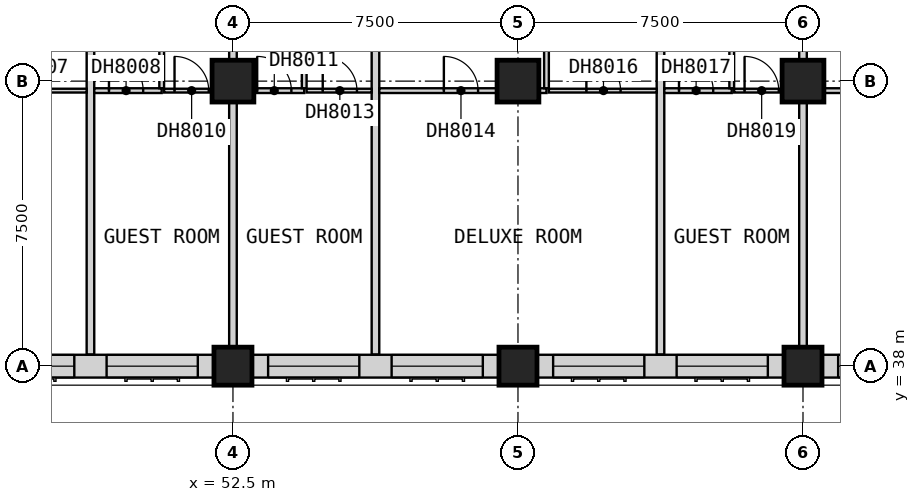
"""IFC4 building model, lengths in metres.
Left out: names, types, materials, properties, quantities, classifications, styles, units other than length and angle.
Written with IfcOpenShell. Run it as: python <this file> out.ifc"""

import sys

from ifc_helpers import new_model, si_unit, direction, frame, frame_2d, origin, origin_2d, place, context, subcontext, project, spatial, rectangle, extrude, element, fill, save


model = new_model("IFC4")
c1 = context("Model", 3, precision=1e-05, world=origin(), true_north=direction((0.0, 1.0)))
c2 = subcontext(c1, "Body", "Model", "MODEL_VIEW")
j1 = project(units=[si_unit("LENGTHUNIT", "METRE"), si_unit("PLANEANGLEUNIT", "RADIAN")], contexts=[c1])
p1 = place(None, origin())
s1 = spatial("IfcSite", under=j1, at=p1, CompositionType="ELEMENT")
p2 = place(p1, origin())
s2 = spatial("IfcBuilding", under=s1, at=p2, CompositionType="ELEMENT")
p3 = place(p2, frame((0.0, 0.0, 89.9)))
s3 = spatial("IfcBuildingStorey", under=s2, at=p3, CompositionType="ELEMENT", Elevation=89.9)
p4 = place(p3, frame((52.5, 38.0, 0.0), z_axis=(0.0, 0.0, 1.0), x_axis=(1.0, 0.0, 0.0)))
e1 = element("IfcColumn", 1, at=p4, inside=s3, PredefinedType="COLUMN", context=c2, shape_type="SweptSolid", body=[
    extrude(rectangle(XDim=1.0, YDim=1.0, at=origin_2d()), origin(), (0.0, 0.0, 1.0), 3.6),
])
p5 = place(p3, frame((52.5, 45.5, 0.0), z_axis=(0.0, 0.0, 1.0), x_axis=(1.0, 0.0, 0.0)))
e2 = element("IfcColumn", 2, at=p5, inside=s3, PredefinedType="COLUMN", context=c2, shape_type="SweptSolid", body=[
    extrude(rectangle(XDim=1.1, YDim=1.1, at=origin_2d()), origin(), (0.0, 0.0, 1.0), 3.6),
])
p6 = place(p3, frame((60.0, 38.0, 0.0), z_axis=(0.0, 0.0, 1.0), x_axis=(1.0, 0.0, 0.0)))
e3 = element("IfcColumn", 3, at=p6, inside=s3, PredefinedType="COLUMN", context=c2, shape_type="SweptSolid", body=[
    extrude(rectangle(XDim=1.0, YDim=1.0, at=origin_2d()), origin(), (0.0, 0.0, 1.0), 3.6),
])
p7 = place(p3, frame((60.0, 45.5, 0.0), z_axis=(0.0, 0.0, 1.0), x_axis=(1.0, 0.0, 0.0)))
e4 = element("IfcColumn", 4, at=p7, inside=s3, PredefinedType="COLUMN", context=c2, shape_type="SweptSolid", body=[
    extrude(rectangle(XDim=1.1, YDim=1.1, at=origin_2d()), origin(), (0.0, 0.0, 1.0), 3.6),
])
p8 = place(p3, frame((67.5, 38.0, 0.0), z_axis=(0.0, 0.0, 1.0), x_axis=(1.0, 0.0, 0.0)))
e5 = element("IfcColumn", 5, at=p8, inside=s3, PredefinedType="COLUMN", context=c2, shape_type="SweptSolid", body=[
    extrude(rectangle(XDim=1.0, YDim=1.0, at=origin_2d()), origin(), (0.0, 0.0, 1.0), 3.6),
])
p9 = place(p3, frame((67.5, 45.5, 0.0), z_axis=(0.0, 0.0, 1.0), x_axis=(1.0, 0.0, 0.0)))
e6 = element("IfcColumn", 6, at=p9, inside=s3, PredefinedType="COLUMN", context=c2, shape_type="SweptSolid", body=[
    extrude(rectangle(XDim=1.1, YDim=1.1, at=origin_2d()), origin(), (0.0, 0.0, 1.0), 3.6),
])
p10 = place(p3, frame((45.5, 38.0, 0.0), z_axis=(0.0, 0.0, 1.0), x_axis=(1.0, 0.0, 0.0)))
e7 = element("IfcWall", 7, at=p10, inside=s3, PredefinedType="SOLIDWALL", context=c2, shape_type="SweptSolid", body=[
    extrude(rectangle(XDim=6.5, YDim=0.6, at=frame_2d((3.25, 0.0))), origin(), (0.0, 0.0, 1.0), 2.85),
])
p11 = place(p10, frame((0.425, 0.0, 0.8)))
e8 = element("IfcOpeningElement", 8, at=p11, cuts=e7, PredefinedType="OPENING", context=c2, shape_type="SweptSolid", body=[
    extrude(rectangle(XDim=2.4, YDim=1.8, at=frame_2d((1.2, 0.9))), frame((0.0, 0.31, 0.0), z_axis=(0.0, -1.0, 0.0), x_axis=(1.0, 0.0, 0.0)), (0.0, 0.0, 1.0), 0.62),
])
p12 = place(p10, frame((3.675, 0.0, 0.8)))
e9 = element("IfcOpeningElement", 9, at=p12, cuts=e7, PredefinedType="OPENING", context=c2, shape_type="SweptSolid", body=[
    extrude(rectangle(XDim=2.4, YDim=1.8, at=frame_2d((1.2, 0.9))), frame((0.0, 0.31, 0.0), z_axis=(0.0, -1.0, 0.0), x_axis=(1.0, 0.0, 0.0)), (0.0, 0.0, 1.0), 0.62),
])
p13 = place(p3, frame((53.0, 38.0, 0.0), z_axis=(0.0, 0.0, 1.0), x_axis=(1.0, 0.0, 0.0)))
e10 = element("IfcWall", 10, at=p13, inside=s3, PredefinedType="SOLIDWALL", context=c2, shape_type="SweptSolid", body=[
    extrude(rectangle(XDim=6.5, YDim=0.6, at=frame_2d((3.25, 0.0))), origin(), (0.0, 0.0, 1.0), 2.85),
])
p14 = place(p13, frame((0.425, 0.0, 0.8)))
e11 = element("IfcOpeningElement", 11, at=p14, cuts=e10, PredefinedType="OPENING", context=c2, shape_type="SweptSolid", body=[
    extrude(rectangle(XDim=2.4, YDim=1.8, at=frame_2d((1.2, 0.9))), frame((0.0, 0.31, 0.0), z_axis=(0.0, -1.0, 0.0), x_axis=(1.0, 0.0, 0.0)), (0.0, 0.0, 1.0), 0.62),
])
p15 = place(p13, frame((3.675, 0.0, 0.8)))
e12 = element("IfcOpeningElement", 12, at=p15, cuts=e10, PredefinedType="OPENING", context=c2, shape_type="SweptSolid", body=[
    extrude(rectangle(XDim=2.4, YDim=1.8, at=frame_2d((1.2, 0.9))), frame((0.0, 0.31, 0.0), z_axis=(0.0, -1.0, 0.0), x_axis=(1.0, 0.0, 0.0)), (0.0, 0.0, 1.0), 0.62),
])
p16 = place(p3, frame((60.5, 38.0, 0.0), z_axis=(0.0, 0.0, 1.0), x_axis=(1.0, 0.0, 0.0)))
e13 = element("IfcWall", 13, at=p16, inside=s3, PredefinedType="SOLIDWALL", context=c2, shape_type="SweptSolid", body=[
    extrude(rectangle(XDim=6.5, YDim=0.6, at=frame_2d((3.25, 0.0))), origin(), (0.0, 0.0, 1.0), 2.85),
])
p17 = place(p16, frame((0.425, 0.0, 0.8)))
e14 = element("IfcOpeningElement", 14, at=p17, cuts=e13, PredefinedType="OPENING", context=c2, shape_type="SweptSolid", body=[
    extrude(rectangle(XDim=2.4, YDim=1.8, at=frame_2d((1.2, 0.9))), frame((0.0, 0.31, 0.0), z_axis=(0.0, -1.0, 0.0), x_axis=(1.0, 0.0, 0.0)), (0.0, 0.0, 1.0), 0.62),
])
p18 = place(p16, frame((3.675, 0.0, 0.8)))
e15 = element("IfcOpeningElement", 15, at=p18, cuts=e13, PredefinedType="OPENING", context=c2, shape_type="SweptSolid", body=[
    extrude(rectangle(XDim=2.4, YDim=1.8, at=frame_2d((1.2, 0.9))), frame((0.0, 0.31, 0.0), z_axis=(0.0, -1.0, 0.0), x_axis=(1.0, 0.0, 0.0)), (0.0, 0.0, 1.0), 0.62),
])
p19 = place(p3, frame((68.0, 38.0, 0.0), z_axis=(0.0, 0.0, 1.0), x_axis=(1.0, 0.0, 0.0)))
e16 = element("IfcWall", 16, at=p19, inside=s3, PredefinedType="SOLIDWALL", context=c2, shape_type="SweptSolid", body=[
    extrude(rectangle(XDim=6.0, YDim=0.6, at=frame_2d((3.0, 0.0))), origin(), (0.0, 0.0, 1.0), 2.85),
])
p20 = place(p19, frame((0.425, 0.0, 0.8)))
e17 = element("IfcOpeningElement", 17, at=p20, cuts=e16, PredefinedType="OPENING", context=c2, shape_type="SweptSolid", body=[
    extrude(rectangle(XDim=2.4, YDim=1.8, at=frame_2d((1.2, 0.9))), frame((0.0, 0.31, 0.0), z_axis=(0.0, -1.0, 0.0), x_axis=(1.0, 0.0, 0.0)), (0.0, 0.0, 1.0), 0.62),
])
p21 = place(p19, frame((3.425, 0.0, 0.8)))
e18 = element("IfcOpeningElement", 18, at=p21, cuts=e16, PredefinedType="OPENING", context=c2, shape_type="SweptSolid", body=[
    extrude(rectangle(XDim=2.4, YDim=1.8, at=frame_2d((1.2, 0.9))), frame((0.0, 0.31, 0.0), z_axis=(0.0, -1.0, 0.0), x_axis=(1.0, 0.0, 0.0)), (0.0, 0.0, 1.0), 0.62),
])
p22 = place(p3, frame((48.75, 38.31, 0.0), z_axis=(0.0, 0.0, 1.0), x_axis=(0.0, 1.0, 0.0)))
e19 = element("IfcWall", 19, at=p22, inside=s3, PredefinedType="PARTITIONING", context=c2, shape_type="SweptSolid", body=[
    extrude(rectangle(XDim=11.715, YDim=0.2, at=frame_2d((5.857, 0.0))), origin(), (0.0, 0.0, 1.0), 3.35),
])
p23 = place(p3, frame((52.5, 37.5, 0.0), z_axis=(0.0, 0.0, 1.0), x_axis=(0.0, 1.0, 0.0)))
e20 = element("IfcWall", 20, at=p23, inside=s3, PredefinedType="PARTITIONING", context=c2, shape_type="SweptSolid", body=[
    extrude(rectangle(XDim=12.525, YDim=0.2, at=frame_2d((6.262, 0.0))), origin(), (0.0, 0.0, 1.0), 3.35),
])
for number, where, z_axis, x_axis in (
    (21, (56.25, 38.31, 0.0), (0.0, 0.0, 1.0), (0.0, 1.0, 0.0)),
    (22, (63.75, 38.31, 0.0), (0.0, 0.0, 1.0), (0.0, 1.0, 0.0)),
):
    element("IfcWall", number, at=place(p3, frame(where, z_axis=z_axis, x_axis=x_axis)), inside=s3, PredefinedType="PARTITIONING", context=c2, shape_type="SweptSolid", body=[
        extrude(rectangle(XDim=11.715, YDim=0.2, at=frame_2d((5.857, 0.0))), origin(), (0.0, 0.0, 1.0), 3.35),
    ])
p24 = place(p3, frame((67.5, 37.5, 0.0), z_axis=(0.0, 0.0, 1.0), x_axis=(0.0, 1.0, 0.0)))
e23 = element("IfcWall", 23, at=p24, inside=s3, PredefinedType="PARTITIONING", context=c2, shape_type="SweptSolid", body=[
    extrude(rectangle(XDim=12.525, YDim=0.2, at=frame_2d((6.262, 0.0))), origin(), (0.0, 0.0, 1.0), 3.35),
])
p25 = place(p3, frame((45.812, 45.25, 0.0), z_axis=(0.0, 0.0, 1.0), x_axis=(1.0, 0.0, 0.0)))
e24 = element("IfcWall", 24, at=p25, inside=s3, PredefinedType="PARTITIONING", context=c2, shape_type="SweptSolid", body=[
    extrude(rectangle(XDim=2.837, YDim=0.1, at=frame_2d((1.419, 0.0))), origin(), (0.0, 0.0, 1.0), 3.35),
])
p26 = place(p25, frame((0.988, 0.0, 0.0)))
e25 = element("IfcOpeningElement", 25, at=p26, cuts=e24, PredefinedType="OPENING", context=c2, shape_type="SweptSolid", body=[
    extrude(rectangle(XDim=0.9, YDim=2.1, at=frame_2d((0.45, 1.05))), frame((0.0, 0.06, 0.0), z_axis=(0.0, -1.0, 0.0), x_axis=(1.0, 0.0, 0.0)), (0.0, 0.0, 1.0), 0.12),
])
p27 = place(p3, frame((50.688, 45.25, 0.0), z_axis=(0.0, 0.0, 1.0), x_axis=(1.0, 0.0, 0.0)))
e26 = element("IfcWall", 26, at=p27, inside=s3, PredefinedType="PARTITIONING", context=c2, shape_type="SweptSolid", body=[
    extrude(rectangle(XDim=1.712, YDim=0.1, at=frame_2d((0.856, 0.0))), origin(), (0.0, 0.0, 1.0), 3.35),
])
p28 = place(p27, frame((0.275, 0.0, 0.0)))
e27 = element("IfcOpeningElement", 27, at=p28, cuts=e26, PredefinedType="OPENING", context=c2, shape_type="SweptSolid", body=[
    extrude(rectangle(XDim=0.9, YDim=2.1, at=frame_2d((0.45, 1.05))), frame((0.0, 0.06, 0.0), z_axis=(0.0, -1.0, 0.0), x_axis=(1.0, 0.0, 0.0)), (0.0, 0.0, 1.0), 0.12),
])
p29 = place(p3, frame((54.438, 45.25, 0.0), z_axis=(0.0, 0.0, 1.0), x_axis=(1.0, 0.0, 0.0)))
e28 = element("IfcWall", 28, at=p29, inside=s3, PredefinedType="PARTITIONING", context=c2, shape_type="SweptSolid", body=[
    extrude(rectangle(XDim=1.712, YDim=0.1, at=frame_2d((0.856, 0.0))), origin(), (0.0, 0.0, 1.0), 3.35),
])
p30 = place(p29, frame((0.425, 0.0, 0.0)))
e29 = element("IfcOpeningElement", 29, at=p30, cuts=e28, PredefinedType="OPENING", context=c2, shape_type="SweptSolid", body=[
    extrude(rectangle(XDim=0.9, YDim=2.1, at=frame_2d((0.45, 1.05))), frame((0.0, 0.06, 0.0), z_axis=(0.0, -1.0, 0.0), x_axis=(1.0, 0.0, 0.0)), (0.0, 0.0, 1.0), 0.12),
])
p31 = place(p3, frame((60.812, 45.25, 0.0), z_axis=(0.0, 0.0, 1.0), x_axis=(1.0, 0.0, 0.0)))
e30 = element("IfcWall", 30, at=p31, inside=s3, PredefinedType="PARTITIONING", context=c2, shape_type="SweptSolid", body=[
    extrude(rectangle(XDim=2.837, YDim=0.1, at=frame_2d((1.419, 0.0))), origin(), (0.0, 0.0, 1.0), 3.35),
])
p32 = place(p31, frame((0.988, 0.0, 0.0)))
e31 = element("IfcOpeningElement", 31, at=p32, cuts=e30, PredefinedType="OPENING", context=c2, shape_type="SweptSolid", body=[
    extrude(rectangle(XDim=0.9, YDim=2.1, at=frame_2d((0.45, 1.05))), frame((0.0, 0.06, 0.0), z_axis=(0.0, -1.0, 0.0), x_axis=(1.0, 0.0, 0.0)), (0.0, 0.0, 1.0), 0.12),
])
p33 = place(p3, frame((65.688, 45.25, 0.0), z_axis=(0.0, 0.0, 1.0), x_axis=(1.0, 0.0, 0.0)))
e32 = element("IfcWall", 32, at=p33, inside=s3, PredefinedType="PARTITIONING", context=c2, shape_type="SweptSolid", body=[
    extrude(rectangle(XDim=1.712, YDim=0.1, at=frame_2d((0.856, 0.0))), origin(), (0.0, 0.0, 1.0), 3.35),
])
p34 = place(p33, frame((0.275, 0.0, 0.0)))
e33 = element("IfcOpeningElement", 33, at=p34, cuts=e32, PredefinedType="OPENING", context=c2, shape_type="SweptSolid", body=[
    extrude(rectangle(XDim=0.9, YDim=2.1, at=frame_2d((0.45, 1.05))), frame((0.0, 0.06, 0.0), z_axis=(0.0, -1.0, 0.0), x_axis=(1.0, 0.0, 0.0)), (0.0, 0.0, 1.0), 0.12),
])
p35 = place(p3, frame((48.85, 45.25, 0.0), z_axis=(0.0, 0.0, 1.0), x_axis=(1.0, 0.0, 0.0)))
e34 = element("IfcWall", 34, at=p35, inside=s3, PredefinedType="PARTITIONING", context=c2, shape_type="SweptSolid", body=[
    extrude(rectangle(XDim=1.775, YDim=0.125, at=frame_2d((0.887, 0.0))), origin(), (0.0, 0.0, 1.0), 3.35),
])
p36 = place(p35, frame((0.387, 0.0, 0.0)))
e35 = element("IfcOpeningElement", 35, at=p36, cuts=e34, PredefinedType="OPENING", context=c2, shape_type="SweptSolid", body=[
    extrude(rectangle(XDim=0.9, YDim=2.1, at=frame_2d((0.45, 1.05))), frame((0.0, 0.073, 0.0), z_axis=(0.0, -1.0, 0.0), x_axis=(1.0, 0.0, 0.0)), (0.0, 0.0, 1.0), 0.145),
])
p37 = place(p3, frame((52.6, 45.25, 0.0), z_axis=(0.0, 0.0, 1.0), x_axis=(1.0, 0.0, 0.0)))
e36 = element("IfcWall", 36, at=p37, inside=s3, PredefinedType="PARTITIONING", context=c2, shape_type="SweptSolid", body=[
    extrude(rectangle(XDim=1.775, YDim=0.125, at=frame_2d((0.887, 0.0))), origin(), (0.0, 0.0, 1.0), 3.35),
])
p38 = place(p37, frame((0.538, 0.0, 0.0)))
e37 = element("IfcOpeningElement", 37, at=p38, cuts=e36, PredefinedType="OPENING", context=c2, shape_type="SweptSolid", body=[
    extrude(rectangle(XDim=0.9, YDim=2.1, at=frame_2d((0.45, 1.05))), frame((0.0, 0.073, 0.0), z_axis=(0.0, -1.0, 0.0), x_axis=(1.0, 0.0, 0.0)), (0.0, 0.0, 1.0), 0.145),
])
p39 = place(p3, frame((56.35, 45.25, 0.0), z_axis=(0.0, 0.0, 1.0), x_axis=(1.0, 0.0, 0.0)))
e38 = element("IfcWall", 38, at=p39, inside=s3, PredefinedType="PARTITIONING", context=c2, shape_type="SweptSolid", body=[
    extrude(rectangle(XDim=4.4, YDim=0.125, at=frame_2d((2.2, 0.0))), origin(), (0.0, 0.0, 1.0), 3.35),
])
p40 = place(p39, frame((1.7, 0.0, 0.0)))
e39 = element("IfcOpeningElement", 39, at=p40, cuts=e38, PredefinedType="OPENING", context=c2, shape_type="SweptSolid", body=[
    extrude(rectangle(XDim=0.9, YDim=2.1, at=frame_2d((0.45, 1.05))), frame((0.0, 0.073, 0.0), z_axis=(0.0, -1.0, 0.0), x_axis=(1.0, 0.0, 0.0)), (0.0, 0.0, 1.0), 0.145),
])
p41 = place(p3, frame((63.85, 45.25, 0.0), z_axis=(0.0, 0.0, 1.0), x_axis=(1.0, 0.0, 0.0)))
e40 = element("IfcWall", 40, at=p41, inside=s3, PredefinedType="PARTITIONING", context=c2, shape_type="SweptSolid", body=[
    extrude(rectangle(XDim=1.775, YDim=0.125, at=frame_2d((0.887, 0.0))), origin(), (0.0, 0.0, 1.0), 3.35),
])
p42 = place(p41, frame((0.387, 0.0, 0.0)))
e41 = element("IfcOpeningElement", 41, at=p42, cuts=e40, PredefinedType="OPENING", context=c2, shape_type="SweptSolid", body=[
    extrude(rectangle(XDim=0.9, YDim=2.1, at=frame_2d((0.45, 1.05))), frame((0.0, 0.073, 0.0), z_axis=(0.0, -1.0, 0.0), x_axis=(1.0, 0.0, 0.0)), (0.0, 0.0, 1.0), 0.145),
])
p43 = place(p3, frame((67.6, 45.25, 0.0), z_axis=(0.0, 0.0, 1.0), x_axis=(1.0, 0.0, 0.0)))
e42 = element("IfcWall", 42, at=p43, inside=s3, PredefinedType="PARTITIONING", context=c2, shape_type="SweptSolid", body=[
    extrude(rectangle(XDim=4.4, YDim=0.125, at=frame_2d((2.2, 0.0))), origin(), (0.0, 0.0, 1.0), 3.35),
])
p44 = place(p43, frame((1.7, 0.0, 0.0)))
e43 = element("IfcOpeningElement", 43, at=p44, cuts=e42, PredefinedType="OPENING", context=c2, shape_type="SweptSolid", body=[
    extrude(rectangle(XDim=0.9, YDim=2.1, at=frame_2d((0.45, 1.05))), frame((0.0, 0.073, 0.0), z_axis=(0.0, -1.0, 0.0), x_axis=(1.0, 0.0, 0.0)), (0.0, 0.0, 1.0), 0.145),
])
for number, where, z_axis, x_axis in (
    (44, (50.625, 45.312, 0.0), (0.0, 0.0, 1.0), (0.0, 1.0, 0.0)),
    (45, (54.375, 45.312, 0.0), (0.0, 0.0, 1.0), (0.0, 1.0, 0.0)),
    (46, (60.75, 45.312, 0.0), (0.0, 0.0, 1.0), (0.0, 1.0, 0.0)),
    (47, (65.625, 45.312, 0.0), (0.0, 0.0, 1.0), (0.0, 1.0, 0.0)),
):
    element("IfcWall", number, at=place(p3, frame(where, z_axis=z_axis, x_axis=x_axis)), inside=s3, PredefinedType="PARTITIONING", context=c2, shape_type="SweptSolid", body=[
        extrude(rectangle(XDim=4.712, YDim=0.125, at=frame_2d((2.356, 0.0))), origin(), (0.0, 0.0, 1.0), 3.35),
    ])
p45 = place(p11, origin())
e48 = element("IfcWindow", 48, at=p45, inside=s3, PartitioningType="SINGLE_PANEL", PredefinedType="WINDOW", context=c2, shape_type="SweptSolid", body=[
    extrude(rectangle(XDim=2.4, YDim=1.8, at=frame_2d((1.2, 0.9))), frame((0.0, -0.07, 0.0), z_axis=(0.0, -1.0, 0.0), x_axis=(1.0, 0.0, 0.0)), (0.0, 0.0, 1.0), 0.06),
])
fill(e8, e48)
p46 = place(p12, origin())
e49 = element("IfcWindow", 49, at=p46, inside=s3, PartitioningType="SINGLE_PANEL", PredefinedType="WINDOW", context=c2, shape_type="SweptSolid", body=[
    extrude(rectangle(XDim=2.4, YDim=1.8, at=frame_2d((1.2, 0.9))), frame((0.0, -0.07, 0.0), z_axis=(0.0, -1.0, 0.0), x_axis=(1.0, 0.0, 0.0)), (0.0, 0.0, 1.0), 0.06),
])
fill(e9, e49)
p47 = place(p14, origin())
e50 = element("IfcWindow", 50, at=p47, inside=s3, PartitioningType="SINGLE_PANEL", PredefinedType="WINDOW", context=c2, shape_type="SweptSolid", body=[
    extrude(rectangle(XDim=2.4, YDim=1.8, at=frame_2d((1.2, 0.9))), frame((0.0, -0.07, 0.0), z_axis=(0.0, -1.0, 0.0), x_axis=(1.0, 0.0, 0.0)), (0.0, 0.0, 1.0), 0.06),
])
fill(e11, e50)
p48 = place(p15, origin())
e51 = element("IfcWindow", 51, at=p48, inside=s3, PartitioningType="SINGLE_PANEL", PredefinedType="WINDOW", context=c2, shape_type="SweptSolid", body=[
    extrude(rectangle(XDim=2.4, YDim=1.8, at=frame_2d((1.2, 0.9))), frame((0.0, -0.07, 0.0), z_axis=(0.0, -1.0, 0.0), x_axis=(1.0, 0.0, 0.0)), (0.0, 0.0, 1.0), 0.06),
])
fill(e12, e51)
p49 = place(p17, origin())
e52 = element("IfcWindow", 52, at=p49, inside=s3, PartitioningType="SINGLE_PANEL", PredefinedType="WINDOW", context=c2, shape_type="SweptSolid", body=[
    extrude(rectangle(XDim=2.4, YDim=1.8, at=frame_2d((1.2, 0.9))), frame((0.0, -0.07, 0.0), z_axis=(0.0, -1.0, 0.0), x_axis=(1.0, 0.0, 0.0)), (0.0, 0.0, 1.0), 0.06),
])
fill(e14, e52)
p50 = place(p18, origin())
e53 = element("IfcWindow", 53, at=p50, inside=s3, PartitioningType="SINGLE_PANEL", PredefinedType="WINDOW", context=c2, shape_type="SweptSolid", body=[
    extrude(rectangle(XDim=2.4, YDim=1.8, at=frame_2d((1.2, 0.9))), frame((0.0, -0.07, 0.0), z_axis=(0.0, -1.0, 0.0), x_axis=(1.0, 0.0, 0.0)), (0.0, 0.0, 1.0), 0.06),
])
fill(e15, e53)
p51 = place(p20, origin())
e54 = element("IfcWindow", 54, at=p51, inside=s3, PartitioningType="SINGLE_PANEL", PredefinedType="WINDOW", context=c2, shape_type="SweptSolid", body=[
    extrude(rectangle(XDim=2.4, YDim=1.8, at=frame_2d((1.2, 0.9))), frame((0.0, -0.07, 0.0), z_axis=(0.0, -1.0, 0.0), x_axis=(1.0, 0.0, 0.0)), (0.0, 0.0, 1.0), 0.06),
])
fill(e17, e54)
p52 = place(p36, origin())
e55 = element("IfcDoor", 55, at=p52, inside=s3, OperationType="SINGLE_SWING_LEFT", PredefinedType="DOOR", context=c2, shape_type="SweptSolid", body=[
    extrude(rectangle(XDim=0.9, YDim=2.1, at=frame_2d((0.45, 1.05))), frame((0.0, 0.025, 0.0), z_axis=(0.0, -1.0, 0.0), x_axis=(1.0, 0.0, 0.0)), (0.0, 0.0, 1.0), 0.05),
])
fill(e35, e55)
p53 = place(p28, origin())
e56 = element("IfcDoor", 56, at=p53, inside=s3, OperationType="SINGLE_SWING_LEFT", PredefinedType="DOOR", context=c2, shape_type="SweptSolid", body=[
    extrude(rectangle(XDim=0.9, YDim=2.1, at=frame_2d((0.45, 1.05))), frame((0.0, 0.025, 0.0), z_axis=(0.0, -1.0, 0.0), x_axis=(1.0, 0.0, 0.0)), (0.0, 0.0, 1.0), 0.05),
])
fill(e27, e56)
p54 = place(p38, origin())
e57 = element("IfcDoor", 57, at=p54, inside=s3, OperationType="SINGLE_SWING_RIGHT", PredefinedType="DOOR", context=c2, shape_type="SweptSolid", body=[
    extrude(rectangle(XDim=0.9, YDim=2.1, at=frame_2d((0.45, 1.05))), frame((0.0, 0.025, 0.0), z_axis=(0.0, -1.0, 0.0), x_axis=(1.0, 0.0, 0.0)), (0.0, 0.0, 1.0), 0.05),
])
fill(e37, e57)
p55 = place(p30, origin())
e58 = element("IfcDoor", 58, at=p55, inside=s3, OperationType="SINGLE_SWING_LEFT", PredefinedType="DOOR", context=c2, shape_type="SweptSolid", body=[
    extrude(rectangle(XDim=0.9, YDim=2.1, at=frame_2d((0.45, 1.05))), frame((0.0, 0.025, 0.0), z_axis=(0.0, -1.0, 0.0), x_axis=(1.0, 0.0, 0.0)), (0.0, 0.0, 1.0), 0.05),
])
fill(e29, e58)
p56 = place(p40, origin())
e59 = element("IfcDoor", 59, at=p56, inside=s3, OperationType="SINGLE_SWING_LEFT", PredefinedType="DOOR", context=c2, shape_type="SweptSolid", body=[
    extrude(rectangle(XDim=0.9, YDim=2.1, at=frame_2d((0.45, 1.05))), frame((0.0, 0.025, 0.0), z_axis=(0.0, -1.0, 0.0), x_axis=(1.0, 0.0, 0.0)), (0.0, 0.0, 1.0), 0.05),
])
fill(e39, e59)
p57 = place(p32, origin())
e60 = element("IfcDoor", 60, at=p57, inside=s3, OperationType="SINGLE_SWING_LEFT", PredefinedType="DOOR", context=c2, shape_type="SweptSolid", body=[
    extrude(rectangle(XDim=0.9, YDim=2.1, at=frame_2d((0.45, 1.05))), frame((0.0, 0.025, 0.0), z_axis=(0.0, -1.0, 0.0), x_axis=(1.0, 0.0, 0.0)), (0.0, 0.0, 1.0), 0.05),
])
fill(e31, e60)
p58 = place(p42, origin())
e61 = element("IfcDoor", 61, at=p58, inside=s3, OperationType="SINGLE_SWING_LEFT", PredefinedType="DOOR", context=c2, shape_type="SweptSolid", body=[
    extrude(rectangle(XDim=0.9, YDim=2.1, at=frame_2d((0.45, 1.05))), frame((0.0, 0.025, 0.0), z_axis=(0.0, -1.0, 0.0), x_axis=(1.0, 0.0, 0.0)), (0.0, 0.0, 1.0), 0.05),
])
fill(e41, e61)
p59 = place(p34, origin())
e62 = element("IfcDoor", 62, at=p59, inside=s3, OperationType="SINGLE_SWING_LEFT", PredefinedType="DOOR", context=c2, shape_type="SweptSolid", body=[
    extrude(rectangle(XDim=0.9, YDim=2.1, at=frame_2d((0.45, 1.05))), frame((0.0, 0.025, 0.0), z_axis=(0.0, -1.0, 0.0), x_axis=(1.0, 0.0, 0.0)), (0.0, 0.0, 1.0), 0.05),
])
fill(e33, e62)
save(model, sys.argv[1])
